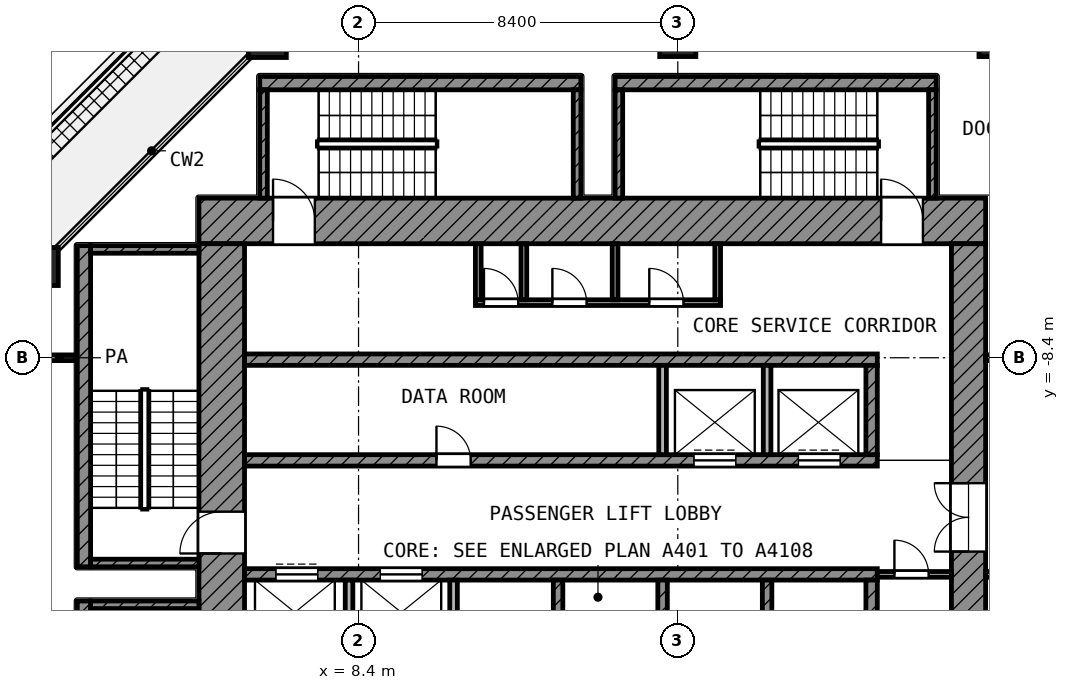
"""IFC4 building model, lengths in metres.
Left out: names, types, materials, properties, quantities, classifications, styles, units other than length and angle.
Written with IfcOpenShell. Run it as: python <this file> out.ifc"""

import sys

from ifc_helpers import new_model, si_unit, direction, frame, frame_2d, origin, origin_2d, place, context, subcontext, project, spatial, rectangle, extrude, element, fill, save


model = new_model("IFC4")
c1 = context("Model", 3, precision=1e-05, world=origin(), true_north=direction((0.0, 1.0)))
c2 = subcontext(c1, "Body", "Model", "MODEL_VIEW")
j1 = project(units=[si_unit("LENGTHUNIT", "METRE"), si_unit("PLANEANGLEUNIT", "RADIAN")], contexts=[c1])
p1 = place(None, origin())
s1 = spatial("IfcSite", under=j1, at=p1, CompositionType="ELEMENT")
p2 = place(p1, origin())
s2 = spatial("IfcBuilding", under=s1, at=p2, CompositionType="ELEMENT")
p3 = place(p2, frame((0.0, 0.0, 179.4)))
s3 = spatial("IfcBuildingStorey", under=s2, at=p3, CompositionType="ELEMENT", Elevation=179.4)
p4 = place(p3, frame((6.0, 0.0, 0.0), z_axis=(0.0, 0.0, 1.0), x_axis=(1.0, 0.0, 0.0)))
e1 = element("IfcColumn", 1, at=p4, inside=s3, PredefinedType="COLUMN", context=c2, shape_type="SweptSolid", body=[
    extrude(rectangle(XDim=1.0, YDim=1.0, at=origin_2d()), origin(), (0.0, 0.0, 1.0), 4.2),
])
for number, where, z_axis, x_axis in (
    (2, (16.8, 0.0, 0.0), (0.0, 0.0, 1.0), (1.0, 0.0, 0.0)),
    (3, (25.2, 0.0, 0.0), (0.0, 0.0, 1.0), (1.0, 0.0, 0.0)),
):
    element("IfcColumn", number, at=place(p3, frame(where, z_axis=z_axis, x_axis=x_axis)), inside=s3, PredefinedType="COLUMN", context=c2, shape_type="SweptSolid", body=[
        extrude(rectangle(XDim=0.95, YDim=0.95, at=origin_2d()), origin(), (0.0, 0.0, 1.0), 4.2),
    ])
p5 = place(p3, frame((0.0, -6.0, 0.0), z_axis=(0.0, 0.0, 1.0), x_axis=(1.0, 0.0, 0.0)))
e4 = element("IfcColumn", 4, at=p5, inside=s3, PredefinedType="COLUMN", context=c2, shape_type="SweptSolid", body=[
    extrude(rectangle(XDim=1.0, YDim=1.0, at=origin_2d()), origin(), (0.0, 0.0, 1.0), 4.2),
])
p6 = place(p3, frame((4.2, -4.8, 0.0), z_axis=(0.0, 0.0, 1.0), x_axis=(1.0, 0.0, 0.0)))
e5 = element("IfcWall", 5, at=p6, inside=s3, PredefinedType="SHEAR", context=c2, shape_type="SweptSolid", body=[
    extrude(rectangle(XDim=20.7, YDim=1.2, at=frame_2d((10.35, 0.0))), origin(), (0.0, 0.0, 1.0), 3.6),
])
p7 = place(p6, frame((1.95, 0.0, 0.0)))
e6 = element("IfcOpeningElement", 6, at=p7, cuts=e5, PredefinedType="OPENING", context=c2, shape_type="SweptSolid", body=[
    extrude(rectangle(XDim=1.1, YDim=2.1, at=frame_2d((0.55, 1.05))), frame((0.0, 0.61, 0.0), z_axis=(0.0, -1.0, 0.0), x_axis=(1.0, 0.0, 0.0)), (0.0, 0.0, 1.0), 1.22),
])
p8 = place(p6, frame((17.95, 0.0, 0.0)))
e7 = element("IfcOpeningElement", 7, at=p8, cuts=e5, PredefinedType="OPENING", context=c2, shape_type="SweptSolid", body=[
    extrude(rectangle(XDim=1.1, YDim=2.1, at=frame_2d((0.55, 1.05))), frame((0.0, 0.61, 0.0), z_axis=(0.0, -1.0, 0.0), x_axis=(1.0, 0.0, 0.0)), (0.0, 0.0, 1.0), 1.22),
])
p9 = place(p3, frame((4.8, -24.9, 0.0), z_axis=(0.0, 0.0, 1.0), x_axis=(0.0, 1.0, 0.0)))
e8 = element("IfcWall", 8, at=p9, inside=s3, PredefinedType="SHEAR", context=c2, shape_type="SweptSolid", body=[
    extrude(rectangle(XDim=19.5, YDim=1.2, at=frame_2d((9.75, 0.0))), origin(), (0.0, 0.0, 1.0), 3.6),
])
p10 = place(p9, frame((11.35, 0.0, 0.0)))
e9 = element("IfcOpeningElement", 9, at=p10, cuts=e8, PredefinedType="OPENING", context=c2, shape_type="SweptSolid", body=[
    extrude(rectangle(XDim=1.1, YDim=2.1, at=frame_2d((0.55, 1.05))), frame((0.0, 0.61, 0.0), z_axis=(0.0, -1.0, 0.0), x_axis=(1.0, 0.0, 0.0)), (0.0, 0.0, 1.0), 1.22),
])
p11 = place(p9, frame((2.05, 0.0, 0.0)))
e10 = element("IfcOpeningElement", 10, at=p11, cuts=e8, PredefinedType="OPENING", context=c2, shape_type="SweptSolid", body=[
    extrude(rectangle(XDim=1.1, YDim=2.1, at=frame_2d((0.55, 1.05))), frame((0.0, 0.61, 0.0), z_axis=(0.0, -1.0, 0.0), x_axis=(1.0, 0.0, 0.0)), (0.0, 0.0, 1.0), 1.22),
])
p12 = place(p3, frame((24.45, -24.0, 0.0), z_axis=(0.0, 0.0, 1.0), x_axis=(0.0, 1.0, 0.0)))
e11 = element("IfcWall", 11, at=p12, inside=s3, PredefinedType="SHEAR", context=c2, shape_type="SweptSolid", body=[
    extrude(rectangle(XDim=18.6, YDim=0.9, at=frame_2d((9.3, 0.0))), origin(), (0.0, 0.0, 1.0), 3.6),
])
p13 = place(p12, frame((10.5, 0.0, 0.0)))
e12 = element("IfcOpeningElement", 12, at=p13, cuts=e11, PredefinedType="OPENING", context=c2, shape_type="SweptSolid", body=[
    extrude(rectangle(XDim=1.8, YDim=2.1, at=frame_2d((0.9, 1.05))), frame((0.0, 0.46, 0.0), z_axis=(0.0, -1.0, 0.0), x_axis=(1.0, 0.0, 0.0)), (0.0, 0.0, 1.0), 0.92),
])
p14 = place(p3, frame((5.4, -8.45, 0.0), z_axis=(0.0, 0.0, 1.0), x_axis=(1.0, 0.0, 0.0)))
e13 = element("IfcWall", 13, at=p14, inside=s3, PredefinedType="SHEAR", context=c2, shape_type="SweptSolid", body=[
    extrude(rectangle(XDim=16.65, YDim=0.3, at=frame_2d((8.325, 0.0))), origin(), (0.0, 0.0, 1.0), 3.6),
])
p15 = place(p3, frame((5.4, -11.1, 0.0), z_axis=(0.0, 0.0, 1.0), x_axis=(1.0, 0.0, 0.0)))
e14 = element("IfcWall", 14, at=p15, inside=s3, PredefinedType="SHEAR", context=c2, shape_type="SweptSolid", body=[
    extrude(rectangle(XDim=16.65, YDim=0.3, at=frame_2d((8.325, 0.0))), origin(), (0.0, 0.0, 1.0), 3.6),
])
p16 = place(p15, frame((11.825, 0.0, 0.0)))
e15 = element("IfcOpeningElement", 15, at=p16, cuts=e14, PredefinedType="OPENING", context=c2, shape_type="SweptSolid", body=[
    extrude(rectangle(XDim=1.1, YDim=2.1, at=frame_2d((0.55, 1.05))), frame((0.0, 0.16, 0.0), z_axis=(0.0, -1.0, 0.0), x_axis=(1.0, 0.0, 0.0)), (0.0, 0.0, 1.0), 0.32),
])
p17 = place(p15, frame((14.575, 0.0, 0.0)))
e16 = element("IfcOpeningElement", 16, at=p17, cuts=e14, PredefinedType="OPENING", context=c2, shape_type="SweptSolid", body=[
    extrude(rectangle(XDim=1.1, YDim=2.1, at=frame_2d((0.55, 1.05))), frame((0.0, 0.16, 0.0), z_axis=(0.0, -1.0, 0.0), x_axis=(1.0, 0.0, 0.0)), (0.0, 0.0, 1.0), 0.32),
])
p18 = place(p15, frame((5.05, 0.0, 0.0)))
e17 = element("IfcOpeningElement", 17, at=p18, cuts=e14, PredefinedType="OPENING", context=c2, shape_type="SweptSolid", body=[
    extrude(rectangle(XDim=0.9, YDim=2.1, at=frame_2d((0.45, 1.05))), frame((0.0, 0.16, 0.0), z_axis=(0.0, -1.0, 0.0), x_axis=(1.0, 0.0, 0.0)), (0.0, 0.0, 1.0), 0.32),
])
p19 = place(p3, frame((5.4, -14.1, 0.0), z_axis=(0.0, 0.0, 1.0), x_axis=(1.0, 0.0, 0.0)))
e18 = element("IfcWall", 18, at=p19, inside=s3, PredefinedType="SHEAR", context=c2, shape_type="SweptSolid", body=[
    extrude(rectangle(XDim=16.65, YDim=0.3, at=frame_2d((8.325, 0.0))), origin(), (0.0, 0.0, 1.0), 3.6),
])
p20 = place(p19, frame((0.825, 0.0, 0.0)))
e19 = element("IfcOpeningElement", 19, at=p20, cuts=e18, PredefinedType="OPENING", context=c2, shape_type="SweptSolid", body=[
    extrude(rectangle(XDim=1.1, YDim=2.1, at=frame_2d((0.55, 1.05))), frame((0.0, 0.16, 0.0), z_axis=(0.0, -1.0, 0.0), x_axis=(1.0, 0.0, 0.0)), (0.0, 0.0, 1.0), 0.32),
])
p21 = place(p19, frame((3.575, 0.0, 0.0)))
e20 = element("IfcOpeningElement", 20, at=p21, cuts=e18, PredefinedType="OPENING", context=c2, shape_type="SweptSolid", body=[
    extrude(rectangle(XDim=1.1, YDim=2.1, at=frame_2d((0.55, 1.05))), frame((0.0, 0.16, 0.0), z_axis=(0.0, -1.0, 0.0), x_axis=(1.0, 0.0, 0.0)), (0.0, 0.0, 1.0), 0.32),
])
p22 = place(p3, frame((21.9, -10.95, 0.0), z_axis=(0.0, 0.0, 1.0), x_axis=(0.0, 1.0, 0.0)))
e21 = element("IfcWall", 21, at=p22, inside=s3, PredefinedType="SHEAR", context=c2, shape_type="SweptSolid", body=[
    extrude(rectangle(XDim=2.35, YDim=0.3, at=frame_2d((1.175, 0.0))), origin(), (0.0, 0.0, 1.0), 3.6),
])
p23 = place(p3, frame((21.9, -16.6, 0.0), z_axis=(0.0, 0.0, 1.0), x_axis=(0.0, 1.0, 0.0)))
e22 = element("IfcWall", 22, at=p23, inside=s3, PredefinedType="SHEAR", context=c2, shape_type="SweptSolid", body=[
    extrude(rectangle(XDim=2.35, YDim=0.3, at=frame_2d((1.175, 0.0))), origin(), (0.0, 0.0, 1.0), 3.6),
])
for number, where, z_axis, x_axis in (
    (23, (16.4, -10.95, 0.0), (0.0, 0.0, 1.0), (0.0, 1.0, 0.0)),
    (24, (19.15, -10.95, 0.0), (0.0, 0.0, 1.0), (0.0, 1.0, 0.0)),
):
    element("IfcWall", number, at=place(p3, frame(where, z_axis=z_axis, x_axis=x_axis)), inside=s3, PredefinedType="PARTITIONING", context=c2, shape_type="SweptSolid", body=[
        extrude(rectangle(XDim=2.35, YDim=0.2, at=frame_2d((1.175, 0.0))), origin(), (0.0, 0.0, 1.0), 3.6),
    ])
for number, where, z_axis, x_axis in (
    (25, (8.15, -16.6, 0.0), (0.0, 0.0, 1.0), (0.0, 1.0, 0.0)),
    (26, (10.9, -16.6, 0.0), (0.0, 0.0, 1.0), (0.0, 1.0, 0.0)),
):
    element("IfcWall", number, at=place(p3, frame(where, z_axis=z_axis, x_axis=x_axis)), inside=s3, PredefinedType="PARTITIONING", context=c2, shape_type="SweptSolid", body=[
        extrude(rectangle(XDim=2.35, YDim=0.2, at=frame_2d((1.175, 0.0))), origin(), (0.0, 0.0, 1.0), 3.6),
    ])
for number, where, z_axis, x_axis in (
    (27, (13.65, -16.6, 0.0), (0.0, 0.0, 1.0), (0.0, 1.0, 0.0)),
    (28, (16.4, -16.6, 0.0), (0.0, 0.0, 1.0), (0.0, 1.0, 0.0)),
    (29, (19.15, -16.6, 0.0), (0.0, 0.0, 1.0), (0.0, 1.0, 0.0)),
):
    element("IfcWall", number, at=place(p3, frame(where, z_axis=z_axis, x_axis=x_axis)), inside=s3, PredefinedType="SHEAR", context=c2, shape_type="SweptSolid", body=[
        extrude(rectangle(XDim=2.35, YDim=0.25, at=frame_2d((1.175, 0.0))), origin(), (0.0, 0.0, 1.0), 3.6),
    ])
p24 = place(p3, frame((22.05, -14.1, 0.0), z_axis=(0.0, 0.0, 1.0), x_axis=(1.0, 0.0, 0.0)))
e30 = element("IfcWall", 30, at=p24, inside=s3, PredefinedType="PARTITIONING", context=c2, shape_type="SweptSolid", body=[
    extrude(rectangle(XDim=1.95, YDim=0.15, at=frame_2d((0.975, 0.0))), origin(), (0.0, 0.0, 1.0), 3.6),
])
p25 = place(p24, frame((0.45, 0.0, 0.0)))
e31 = element("IfcOpeningElement", 31, at=p25, cuts=e30, PredefinedType="OPENING", context=c2, shape_type="SweptSolid", body=[
    extrude(rectangle(XDim=0.9, YDim=2.1, at=frame_2d((0.45, 1.05))), frame((0.0, 0.085, 0.0), z_axis=(0.0, -1.0, 0.0), x_axis=(1.0, 0.0, 0.0)), (0.0, 0.0, 1.0), 0.17),
])
p26 = place(p3, frame((11.475, -6.95, 0.0), z_axis=(0.0, 0.0, 1.0), x_axis=(1.0, 0.0, 0.0)))
e32 = element("IfcWall", 32, at=p26, inside=s3, PredefinedType="PARTITIONING", context=c2, shape_type="SweptSolid", body=[
    extrude(rectangle(XDim=6.45, YDim=0.15, at=frame_2d((3.225, 0.0))), origin(), (0.0, 0.0, 1.0), 3.6),
])
p27 = place(p26, frame((0.225, 0.0, 0.0)))
e33 = element("IfcOpeningElement", 33, at=p27, cuts=e32, PredefinedType="OPENING", context=c2, shape_type="SweptSolid", body=[
    extrude(rectangle(XDim=0.9, YDim=2.1, at=frame_2d((0.45, 1.05))), frame((0.0, 0.085, 0.0), z_axis=(0.0, -1.0, 0.0), x_axis=(1.0, 0.0, 0.0)), (0.0, 0.0, 1.0), 0.17),
])
p28 = place(p26, frame((2.025, 0.0, 0.0)))
e34 = element("IfcOpeningElement", 34, at=p28, cuts=e32, PredefinedType="OPENING", context=c2, shape_type="SweptSolid", body=[
    extrude(rectangle(XDim=0.9, YDim=2.1, at=frame_2d((0.45, 1.05))), frame((0.0, 0.085, 0.0), z_axis=(0.0, -1.0, 0.0), x_axis=(1.0, 0.0, 0.0)), (0.0, 0.0, 1.0), 0.17),
])
p29 = place(p26, frame((4.575, 0.0, 0.0)))
e35 = element("IfcOpeningElement", 35, at=p29, cuts=e32, PredefinedType="OPENING", context=c2, shape_type="SweptSolid", body=[
    extrude(rectangle(XDim=0.9, YDim=2.1, at=frame_2d((0.45, 1.05))), frame((0.0, 0.085, 0.0), z_axis=(0.0, -1.0, 0.0), x_axis=(1.0, 0.0, 0.0)), (0.0, 0.0, 1.0), 0.17),
])
for number, where, z_axis, x_axis in (
    (36, (11.55, -6.875, 0.0), (0.0, 0.0, 1.0), (0.0, 1.0, 0.0)),
    (37, (12.75, -6.875, 0.0), (0.0, 0.0, 1.0), (0.0, 1.0, 0.0)),
    (38, (15.15, -6.875, 0.0), (0.0, 0.0, 1.0), (0.0, 1.0, 0.0)),
    (39, (17.85, -6.875, 0.0), (0.0, 0.0, 1.0), (0.0, 1.0, 0.0)),
):
    element("IfcWall", number, at=place(p3, frame(where, z_axis=z_axis, x_axis=x_axis)), inside=s3, PredefinedType="PARTITIONING", context=c2, shape_type="SweptSolid", body=[
        extrude(rectangle(XDim=1.475, YDim=0.15, at=frame_2d((0.738, 0.0))), origin(), (0.0, 0.0, 1.0), 3.6),
    ])
p30 = place(p3, frame((1.175, -13.9, 0.0), z_axis=(0.0, 0.0, 1.0), x_axis=(0.0, 1.0, 0.0)))
e40 = element("IfcWall", 40, at=p30, inside=s3, PredefinedType="SHEAR", context=c2, shape_type="SweptSolid", body=[
    extrude(rectangle(XDim=8.45, YDim=0.35, at=frame_2d((4.225, 0.0))), origin(), (0.0, 0.0, 1.0), 3.6),
])
for number, where, z_axis, x_axis in (
    (41, (1.35, -5.55, 0.0), (0.0, 0.0, 1.0), (1.0, 0.0, 0.0)),
    (42, (1.35, -13.8, 0.0), (0.0, 0.0, 1.0), (1.0, 0.0, 0.0)),
):
    element("IfcWall", number, at=place(p3, frame(where, z_axis=z_axis, x_axis=x_axis)), inside=s3, PredefinedType="SHEAR", context=c2, shape_type="SweptSolid", body=[
        extrude(rectangle(XDim=2.85, YDim=0.2, at=frame_2d((1.425, 0.0))), origin(), (0.0, 0.0, 1.0), 3.6),
    ])
p31 = place(p3, frame((1.175, -23.25, 0.0), z_axis=(0.0, 0.0, 1.0), x_axis=(0.0, 1.0, 0.0)))
e43 = element("IfcWall", 43, at=p31, inside=s3, PredefinedType="SHEAR", context=c2, shape_type="SweptSolid", body=[
    extrude(rectangle(XDim=8.45, YDim=0.35, at=frame_2d((4.225, 0.0))), origin(), (0.0, 0.0, 1.0), 3.6),
])
p32 = place(p3, frame((1.35, -14.9, 0.0), z_axis=(0.0, 0.0, 1.0), x_axis=(1.0, 0.0, 0.0)))
e44 = element("IfcWall", 44, at=p32, inside=s3, PredefinedType="SHEAR", context=c2, shape_type="SweptSolid", body=[
    extrude(rectangle(XDim=2.85, YDim=0.2, at=frame_2d((1.425, 0.0))), origin(), (0.0, 0.0, 1.0), 3.6),
])
p33 = place(p3, frame((5.8, -1.175, 0.0), z_axis=(0.0, 0.0, 1.0), x_axis=(1.0, 0.0, 0.0)))
e45 = element("IfcWall", 45, at=p33, inside=s3, PredefinedType="SHEAR", context=c2, shape_type="SweptSolid", body=[
    extrude(rectangle(XDim=8.45, YDim=0.35, at=frame_2d((4.225, 0.0))), origin(), (0.0, 0.0, 1.0), 3.6),
])
for number, where, z_axis, x_axis in (
    (46, (5.9, -4.2, 0.0), (0.0, 0.0, 1.0), (0.0, 1.0, 0.0)),
    (47, (14.15, -4.2, 0.0), (0.0, 0.0, 1.0), (0.0, 1.0, 0.0)),
):
    element("IfcWall", number, at=place(p3, frame(where, z_axis=z_axis, x_axis=x_axis)), inside=s3, PredefinedType="SHEAR", context=c2, shape_type="SweptSolid", body=[
        extrude(rectangle(XDim=2.85, YDim=0.2, at=frame_2d((1.425, 0.0))), origin(), (0.0, 0.0, 1.0), 3.6),
    ])
p34 = place(p3, frame((15.15, -1.175, 0.0), z_axis=(0.0, 0.0, 1.0), x_axis=(1.0, 0.0, 0.0)))
e48 = element("IfcWall", 48, at=p34, inside=s3, PredefinedType="SHEAR", context=c2, shape_type="SweptSolid", body=[
    extrude(rectangle(XDim=8.45, YDim=0.35, at=frame_2d((4.225, 0.0))), origin(), (0.0, 0.0, 1.0), 3.6),
])
for number, where, z_axis, x_axis in (
    (49, (15.25, -4.2, 0.0), (0.0, 0.0, 1.0), (0.0, 1.0, 0.0)),
    (50, (23.5, -4.2, 0.0), (0.0, 0.0, 1.0), (0.0, 1.0, 0.0)),
):
    element("IfcWall", number, at=place(p3, frame(where, z_axis=z_axis, x_axis=x_axis)), inside=s3, PredefinedType="SHEAR", context=c2, shape_type="SweptSolid", body=[
        extrude(rectangle(XDim=2.85, YDim=0.2, at=frame_2d((1.425, 0.0))), origin(), (0.0, 0.0, 1.0), 3.6),
    ])
p35 = place(p3, frame((24.9, -14.1, 0.0), z_axis=(0.0, 0.0, 1.0), x_axis=(1.0, 0.0, 0.0)))
e51 = element("IfcWall", 51, at=p35, inside=s3, PredefinedType="PARTITIONING", context=c2, shape_type="SweptSolid", body=[
    extrude(rectangle(XDim=4.425, YDim=0.15, at=frame_2d((2.212, 0.0))), origin(), (0.0, 0.0, 1.0), 3.6),
])
p36 = place(p35, frame((1.65, 0.0, 0.0)))
e52 = element("IfcOpeningElement", 52, at=p36, cuts=e51, PredefinedType="OPENING", context=c2, shape_type="SweptSolid", body=[
    extrude(rectangle(XDim=1.5, YDim=2.1, at=frame_2d((0.75, 1.05))), frame((0.0, 0.085, 0.0), z_axis=(0.0, -1.0, 0.0), x_axis=(1.0, 0.0, 0.0)), (0.0, 0.0, 1.0), 0.17),
])
p37 = place(p3, frame((0.08, -8.4, 0.0), z_axis=(0.0, 0.0, 1.0), x_axis=(1.0, 0.0, 0.0)))
e53 = element("IfcWall", 53, at=p37, inside=s3, PredefinedType="PARTITIONING", context=c2, shape_type="SweptSolid", body=[
    extrude(rectangle(XDim=0.89, YDim=0.15, at=frame_2d((0.445, 0.0))), origin(), (0.0, 0.0, 1.0), 3.6),
])
p38 = place(p3, frame((24.9, -8.4, 0.0), z_axis=(0.0, 0.0, 1.0), x_axis=(1.0, 0.0, 0.0)))
e54 = element("IfcWall", 54, at=p38, inside=s3, PredefinedType="PARTITIONING", context=c2, shape_type="SweptSolid", body=[
    extrude(rectangle(XDim=15.282, YDim=0.15, at=frame_2d((7.641, 0.0))), origin(), (0.0, 0.0, 1.0), 3.6),
])
p39 = place(p38, frame((1.75, 0.0, 0.0)))
e55 = element("IfcOpeningElement", 55, at=p39, cuts=e54, PredefinedType="OPENING", context=c2, shape_type="SweptSolid", body=[
    extrude(rectangle(XDim=1.0, YDim=2.1, at=frame_2d((0.5, 1.05))), frame((0.0, 0.085, 0.0), z_axis=(0.0, -1.0, 0.0), x_axis=(1.0, 0.0, 0.0)), (0.0, 0.0, 1.0), 0.17),
])
p40 = place(p38, frame((5.85, 0.0, 0.0)))
e56 = element("IfcOpeningElement", 56, at=p40, cuts=e54, PredefinedType="OPENING", context=c2, shape_type="SweptSolid", body=[
    extrude(rectangle(XDim=1.2, YDim=2.1, at=frame_2d((0.6, 1.05))), frame((0.0, 0.085, 0.0), z_axis=(0.0, -1.0, 0.0), x_axis=(1.0, 0.0, 0.0)), (0.0, 0.0, 1.0), 0.17),
])
p41 = place(p38, frame((9.3, 0.0, 0.0)))
e57 = element("IfcOpeningElement", 57, at=p41, cuts=e54, PredefinedType="OPENING", context=c2, shape_type="SweptSolid", body=[
    extrude(rectangle(XDim=1.2, YDim=2.1, at=frame_2d((0.6, 1.05))), frame((0.0, 0.085, 0.0), z_axis=(0.0, -1.0, 0.0), x_axis=(1.0, 0.0, 0.0)), (0.0, 0.0, 1.0), 0.17),
])
p42 = place(p16, origin())
e58 = element("IfcDoor", 58, at=p42, inside=s3, OperationType="DOUBLE_DOOR_SLIDING", PredefinedType="DOOR", context=c2, shape_type="SweptSolid", body=[
    extrude(rectangle(XDim=1.1, YDim=2.1, at=frame_2d((0.55, 1.05))), frame((0.0, 0.025, 0.0), z_axis=(0.0, -1.0, 0.0), x_axis=(1.0, 0.0, 0.0)), (0.0, 0.0, 1.0), 0.05),
])
fill(e15, e58)
p43 = place(p17, origin())
e59 = element("IfcDoor", 59, at=p43, inside=s3, OperationType="DOUBLE_DOOR_SLIDING", PredefinedType="DOOR", context=c2, shape_type="SweptSolid", body=[
    extrude(rectangle(XDim=1.1, YDim=2.1, at=frame_2d((0.55, 1.05))), frame((0.0, 0.025, 0.0), z_axis=(0.0, -1.0, 0.0), x_axis=(1.0, 0.0, 0.0)), (0.0, 0.0, 1.0), 0.05),
])
fill(e16, e59)
p44 = place(p20, origin())
e60 = element("IfcDoor", 60, at=p44, inside=s3, OperationType="DOUBLE_DOOR_SLIDING", PredefinedType="DOOR", context=c2, shape_type="SweptSolid", body=[
    extrude(rectangle(XDim=1.1, YDim=2.1, at=frame_2d((0.55, 1.05))), frame((0.0, 0.025, 0.0), z_axis=(0.0, -1.0, 0.0), x_axis=(1.0, 0.0, 0.0)), (0.0, 0.0, 1.0), 0.05),
])
fill(e19, e60)
p45 = place(p21, origin())
e61 = element("IfcDoor", 61, at=p45, inside=s3, OperationType="DOUBLE_DOOR_SLIDING", PredefinedType="DOOR", context=c2, shape_type="SweptSolid", body=[
    extrude(rectangle(XDim=1.1, YDim=2.1, at=frame_2d((0.55, 1.05))), frame((0.0, 0.025, 0.0), z_axis=(0.0, -1.0, 0.0), x_axis=(1.0, 0.0, 0.0)), (0.0, 0.0, 1.0), 0.05),
])
fill(e20, e61)
p46 = place(p10, origin())
e62 = element("IfcDoor", 62, at=p46, inside=s3, OperationType="SINGLE_SWING_LEFT", PredefinedType="DOOR", context=c2, shape_type="SweptSolid", body=[
    extrude(rectangle(XDim=1.1, YDim=2.1, at=frame_2d((0.55, 1.05))), frame((0.0, 0.025, 0.0), z_axis=(0.0, -1.0, 0.0), x_axis=(1.0, 0.0, 0.0)), (0.0, 0.0, 1.0), 0.05),
])
fill(e9, e62)
p47 = place(p7, origin())
e63 = element("IfcDoor", 63, at=p47, inside=s3, OperationType="SINGLE_SWING_LEFT", PredefinedType="DOOR", context=c2, shape_type="SweptSolid", body=[
    extrude(rectangle(XDim=1.1, YDim=2.1, at=frame_2d((0.55, 1.05))), frame((0.0, 0.025, 0.0), z_axis=(0.0, -1.0, 0.0), x_axis=(1.0, 0.0, 0.0)), (0.0, 0.0, 1.0), 0.05),
])
fill(e6, e63)
p48 = place(p8, origin())
e64 = element("IfcDoor", 64, at=p48, inside=s3, OperationType="SINGLE_SWING_LEFT", PredefinedType="DOOR", context=c2, shape_type="SweptSolid", body=[
    extrude(rectangle(XDim=1.1, YDim=2.1, at=frame_2d((0.55, 1.05))), frame((0.0, 0.025, 0.0), z_axis=(0.0, -1.0, 0.0), x_axis=(1.0, 0.0, 0.0)), (0.0, 0.0, 1.0), 0.05),
])
fill(e7, e64)
p49 = place(p13, origin())
e65 = element("IfcDoor", 65, at=p49, inside=s3, OperationType="DOUBLE_DOOR_SINGLE_SWING", PredefinedType="DOOR", context=c2, shape_type="SweptSolid", body=[
    extrude(rectangle(XDim=1.8, YDim=2.1, at=frame_2d((0.9, 1.05))), frame((0.0, 0.025, 0.0), z_axis=(0.0, -1.0, 0.0), x_axis=(1.0, 0.0, 0.0)), (0.0, 0.0, 1.0), 0.05),
])
fill(e12, e65)
p50 = place(p27, origin())
e66 = element("IfcDoor", 66, at=p50, inside=s3, OperationType="SINGLE_SWING_LEFT", PredefinedType="DOOR", context=c2, shape_type="SweptSolid", body=[
    extrude(rectangle(XDim=0.9, YDim=2.1, at=frame_2d((0.45, 1.05))), frame((0.0, 0.025, 0.0), z_axis=(0.0, -1.0, 0.0), x_axis=(1.0, 0.0, 0.0)), (0.0, 0.0, 1.0), 0.05),
])
fill(e33, e66)
p51 = place(p28, origin())
e67 = element("IfcDoor", 67, at=p51, inside=s3, OperationType="SINGLE_SWING_LEFT", PredefinedType="DOOR", context=c2, shape_type="SweptSolid", body=[
    extrude(rectangle(XDim=0.9, YDim=2.1, at=frame_2d((0.45, 1.05))), frame((0.0, 0.025, 0.0), z_axis=(0.0, -1.0, 0.0), x_axis=(1.0, 0.0, 0.0)), (0.0, 0.0, 1.0), 0.05),
])
fill(e34, e67)
p52 = place(p29, origin())
e68 = element("IfcDoor", 68, at=p52, inside=s3, OperationType="SINGLE_SWING_LEFT", PredefinedType="DOOR", context=c2, shape_type="SweptSolid", body=[
    extrude(rectangle(XDim=0.9, YDim=2.1, at=frame_2d((0.45, 1.05))), frame((0.0, 0.025, 0.0), z_axis=(0.0, -1.0, 0.0), x_axis=(1.0, 0.0, 0.0)), (0.0, 0.0, 1.0), 0.05),
])
fill(e35, e68)
p53 = place(p25, origin())
e69 = element("IfcDoor", 69, at=p53, inside=s3, OperationType="SINGLE_SWING_LEFT", PredefinedType="DOOR", context=c2, shape_type="SweptSolid", body=[
    extrude(rectangle(XDim=0.9, YDim=2.1, at=frame_2d((0.45, 1.05))), frame((0.0, 0.025, 0.0), z_axis=(0.0, -1.0, 0.0), x_axis=(1.0, 0.0, 0.0)), (0.0, 0.0, 1.0), 0.05),
])
fill(e31, e69)
p54 = place(p18, origin())
e70 = element("IfcDoor", 70, at=p54, inside=s3, OperationType="SINGLE_SWING_LEFT", PredefinedType="DOOR", context=c2, shape_type="SweptSolid", body=[
    extrude(rectangle(XDim=0.9, YDim=2.1, at=frame_2d((0.45, 1.05))), frame((0.0, 0.025, 0.0), z_axis=(0.0, -1.0, 0.0), x_axis=(1.0, 0.0, 0.0)), (0.0, 0.0, 1.0), 0.05),
])
fill(e17, e70)
save(model, sys.argv[1])
